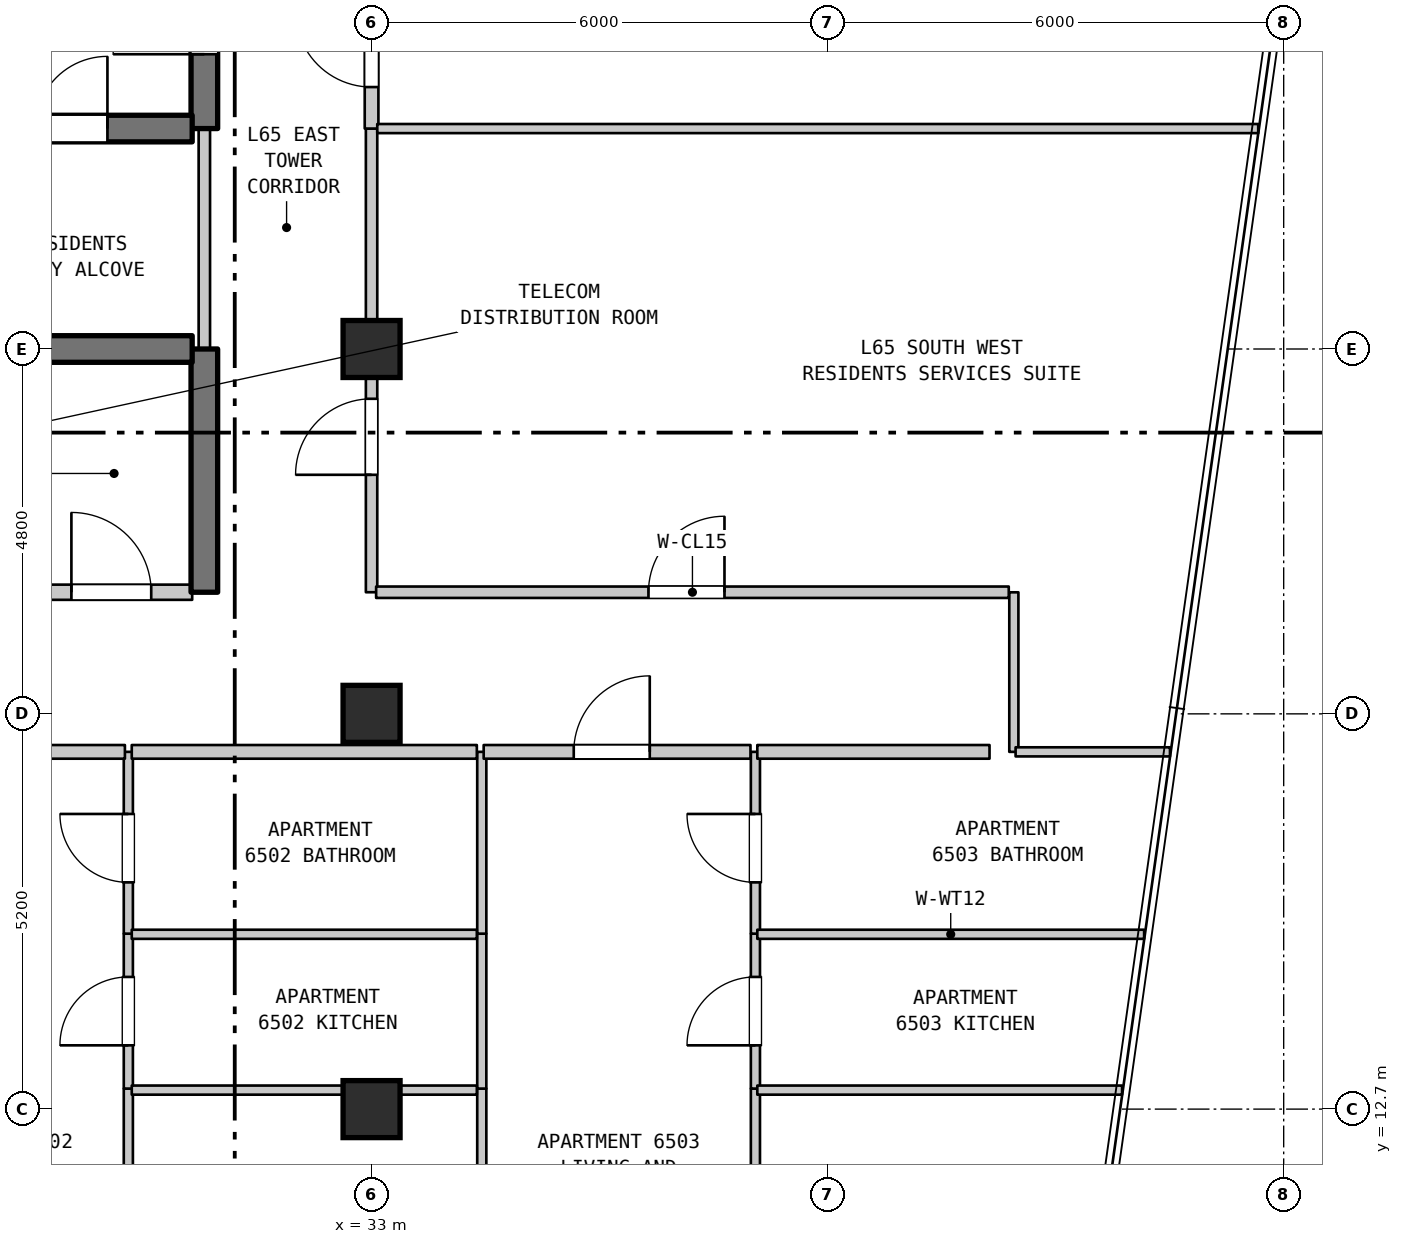
"""IFC4 building model, lengths in metres.
Left out: names, types, materials, properties, quantities, classifications, styles, units other than length and angle.
Written with IfcOpenShell. Run it as: python <this file> out.ifc"""

import sys

from ifc_helpers import new_model, si_unit, direction, frame, frame_2d, origin, origin_2d, place, context, subcontext, project, spatial, rectangle, extrude, element, fill, save


model = new_model("IFC4")
c1 = context("Model", 3, precision=1e-05, world=origin(), true_north=direction((0.0, 1.0)))
c2 = subcontext(c1, "Body", "Model", "MODEL_VIEW")
j1 = project(units=[si_unit("LENGTHUNIT", "METRE"), si_unit("PLANEANGLEUNIT", "RADIAN")], contexts=[c1])
p1 = place(None, origin())
s1 = spatial("IfcSite", under=j1, at=p1, CompositionType="ELEMENT")
p2 = place(p1, origin())
s2 = spatial("IfcBuilding", under=s1, at=p2, CompositionType="ELEMENT")
p3 = place(p2, frame((0.0, 0.0, 262.1)))
s3 = spatial("IfcBuildingStorey", under=s2, at=p3, CompositionType="ELEMENT", Elevation=262.1)
for number, where, z_axis, x_axis in (
    (1, (33.0, 12.7, 0.0), (0.0, 0.0, 1.0), (1.0, 0.0, 0.0)),
    (2, (33.0, 17.9, 0.0), (0.0, 0.0, 1.0), (1.0, 0.0, 0.0)),
    (3, (33.0, 22.7, 0.0), (0.0, 0.0, 1.0), (1.0, 0.0, 0.0)),
):
    element("IfcColumn", number, at=place(p3, frame(where, z_axis=z_axis, x_axis=x_axis)), inside=s3, PredefinedType="COLUMN", context=c2, shape_type="SweptSolid", body=[
        extrude(rectangle(XDim=0.75, YDim=0.75, at=origin_2d()), origin(), (0.0, 0.0, 1.0), 3.7),
    ])
p4 = place(p3, frame((29.8, 6.71, 0.0), z_axis=(0.0, 0.0, 1.0), x_axis=(0.0, 1.0, 0.0)))
e4 = element("IfcWall", 4, at=p4, inside=s3, PredefinedType="PARTITIONING", context=c2, shape_type="SweptSolid", body=[
    extrude(rectangle(XDim=6.26, YDim=0.12, at=frame_2d((3.13, 0.0))), origin(), (0.0, 0.0, 1.0), 3.39),
])
p5 = place(p4, frame((2.68, 0.0, 0.0)))
e5 = element("IfcOpeningElement", 5, at=p5, cuts=e4, PredefinedType="OPENING", context=c2, shape_type="SweptSolid", body=[
    extrude(rectangle(XDim=0.9, YDim=2.15, at=frame_2d((0.45, 1.075))), frame((0.0, 0.07, 0.0), z_axis=(0.0, -1.0, 0.0), x_axis=(1.0, 0.0, 0.0)), (0.0, 0.0, 1.0), 0.14),
])
p6 = place(p3, frame((29.8, 12.97, 0.0), z_axis=(0.0, 0.0, 1.0), x_axis=(0.0, 1.0, 0.0)))
e6 = element("IfcWall", 6, at=p6, inside=s3, PredefinedType="PARTITIONING", context=c2, shape_type="SweptSolid", body=[
    extrude(rectangle(XDim=2.038, YDim=0.12, at=frame_2d((1.019, 0.0))), origin(), (0.0, 0.0, 1.0), 3.39),
])
p7 = place(p6, frame((0.569, 0.0, 0.0)))
e7 = element("IfcOpeningElement", 7, at=p7, cuts=e6, PredefinedType="OPENING", context=c2, shape_type="SweptSolid", body=[
    extrude(rectangle(XDim=0.9, YDim=2.15, at=frame_2d((0.45, 1.075))), frame((0.0, 0.07, 0.0), z_axis=(0.0, -1.0, 0.0), x_axis=(1.0, 0.0, 0.0)), (0.0, 0.0, 1.0), 0.14),
])
p8 = place(p3, frame((29.8, 15.008, 0.0), z_axis=(0.0, 0.0, 1.0), x_axis=(0.0, 1.0, 0.0)))
e8 = element("IfcWall", 8, at=p8, inside=s3, PredefinedType="PARTITIONING", context=c2, shape_type="SweptSolid", body=[
    extrude(rectangle(XDim=2.392, YDim=0.12, at=frame_2d((1.196, 0.0))), origin(), (0.0, 0.0, 1.0), 3.39),
])
p9 = place(p8, frame((0.675, 0.0, 0.0)))
e9 = element("IfcOpeningElement", 9, at=p9, cuts=e8, PredefinedType="OPENING", context=c2, shape_type="SweptSolid", body=[
    extrude(rectangle(XDim=0.9, YDim=2.1, at=frame_2d((0.45, 1.05))), frame((0.0, 0.07, 0.0), z_axis=(0.0, -1.0, 0.0), x_axis=(1.0, 0.0, 0.0)), (0.0, 0.0, 1.0), 0.14),
])
p10 = place(p3, frame((30.8, 19.5, 0.0), z_axis=(0.0, 0.0, 1.0), x_axis=(0.0, 1.0, 0.0)))
e10 = element("IfcWall", 10, at=p10, inside=s3, PredefinedType="SHEAR", context=c2, shape_type="SweptSolid", body=[
    extrude(rectangle(XDim=3.2, YDim=0.35, at=frame_2d((1.6, 0.0))), origin(), (0.0, 0.0, 1.0), 3.39),
])
p11 = place(p3, frame((30.8, 22.7, 0.0), z_axis=(0.0, 0.0, 1.0), x_axis=(0.0, 1.0, 0.0)))
e11 = element("IfcWall", 11, at=p11, inside=s3, PredefinedType="STANDARD", context=c2, shape_type="SweptSolid", body=[
    extrude(rectangle(XDim=2.9, YDim=0.15, at=frame_2d((1.45, 0.0))), origin(), (0.0, 0.0, 1.0), 3.39),
])
p12 = place(p3, frame((30.8, 25.6, 0.0), z_axis=(0.0, 0.0, 1.0), x_axis=(0.0, 1.0, 0.0)))
e12 = element("IfcWall", 12, at=p12, inside=s3, PredefinedType="SHEAR", context=c2, shape_type="SweptSolid", body=[
    extrude(rectangle(XDim=3.3, YDim=0.35, at=frame_2d((1.65, 0.0))), origin(), (0.0, 0.0, 1.0), 3.39),
])
p13 = place(p12, frame((0.978, 0.0, 0.0)))
e13 = element("IfcOpeningElement", 13, at=p13, cuts=e12, PredefinedType="OPENING", context=c2, shape_type="SweptSolid", body=[
    extrude(rectangle(XDim=1.2, YDim=2.2, at=frame_2d((0.6, 1.1))), frame((0.0, 0.185, 0.0), z_axis=(0.0, -1.0, 0.0), x_axis=(1.0, 0.0, 0.0)), (0.0, 0.0, 1.0), 0.37),
])
p14 = place(p3, frame((33.0, 19.5, 0.0), z_axis=(0.0, 0.0, 1.0), x_axis=(0.0, 1.0, 0.0)))
e14 = element("IfcWall", 14, at=p14, inside=s3, PredefinedType="STANDARD", context=c2, shape_type="SweptSolid", body=[
    extrude(rectangle(XDim=6.1, YDim=0.15, at=frame_2d((3.05, 0.0))), origin(), (0.0, 0.0, 1.0), 3.1),
])
p15 = place(p14, frame((1.545, 0.0, 0.0)))
e15 = element("IfcOpeningElement", 15, at=p15, cuts=e14, PredefinedType="OPENING", context=c2, shape_type="SweptSolid", body=[
    extrude(rectangle(XDim=1.0, YDim=2.15, at=frame_2d((0.5, 1.075))), frame((0.0, 0.085, 0.0), z_axis=(0.0, -1.0, 0.0), x_axis=(1.0, 0.0, 0.0)), (0.0, 0.0, 1.0), 0.17),
])
p16 = place(p3, frame((33.0, 25.6, 0.0), z_axis=(0.0, 0.0, 1.0), x_axis=(0.0, 1.0, 0.0)))
e16 = element("IfcWall", 16, at=p16, inside=s3, PredefinedType="STANDARD", context=c2, shape_type="SweptSolid", body=[
    extrude(rectangle(XDim=2.3, YDim=0.18, at=frame_2d((1.15, 0.0))), origin(), (0.0, 0.0, 1.0), 3.1),
])
p17 = place(p16, frame((0.546, 0.0, 0.0)))
e17 = element("IfcOpeningElement", 17, at=p17, cuts=e16, PredefinedType="OPENING", context=c2, shape_type="SweptSolid", body=[
    extrude(rectangle(XDim=1.0, YDim=2.15, at=frame_2d((0.5, 1.075))), frame((0.0, 0.1, 0.0), z_axis=(0.0, -1.0, 0.0), x_axis=(1.0, 0.0, 0.0)), (0.0, 0.0, 1.0), 0.2),
])
p18 = place(p3, frame((34.45, 6.71, 0.0), z_axis=(0.0, 0.0, 1.0), x_axis=(0.0, 1.0, 0.0)))
e18 = element("IfcWall", 18, at=p18, inside=s3, PredefinedType="PARTITIONING", context=c2, shape_type="SweptSolid", body=[
    extrude(rectangle(XDim=6.26, YDim=0.12, at=frame_2d((3.13, 0.0))), origin(), (0.0, 0.0, 1.0), 3.39),
])
p19 = place(p3, frame((34.45, 12.97, 0.0), z_axis=(0.0, 0.0, 1.0), x_axis=(0.0, 1.0, 0.0)))
e19 = element("IfcWall", 19, at=p19, inside=s3, PredefinedType="PARTITIONING", context=c2, shape_type="SweptSolid", body=[
    extrude(rectangle(XDim=2.038, YDim=0.12, at=frame_2d((1.019, 0.0))), origin(), (0.0, 0.0, 1.0), 3.39),
])
p20 = place(p3, frame((34.45, 15.008, 0.0), z_axis=(0.0, 0.0, 1.0), x_axis=(0.0, 1.0, 0.0)))
e20 = element("IfcWall", 20, at=p20, inside=s3, PredefinedType="PARTITIONING", context=c2, shape_type="SweptSolid", body=[
    extrude(rectangle(XDim=2.392, YDim=0.12, at=frame_2d((1.196, 0.0))), origin(), (0.0, 0.0, 1.0), 3.39),
])
p21 = place(p3, frame((38.05, 6.71, 0.0), z_axis=(0.0, 0.0, 1.0), x_axis=(0.0, 1.0, 0.0)))
e21 = element("IfcWall", 21, at=p21, inside=s3, PredefinedType="PARTITIONING", context=c2, shape_type="SweptSolid", body=[
    extrude(rectangle(XDim=6.26, YDim=0.12, at=frame_2d((3.13, 0.0))), origin(), (0.0, 0.0, 1.0), 3.39),
])
p22 = place(p21, frame((2.68, 0.0, 0.0)))
e22 = element("IfcOpeningElement", 22, at=p22, cuts=e21, PredefinedType="OPENING", context=c2, shape_type="SweptSolid", body=[
    extrude(rectangle(XDim=0.9, YDim=2.15, at=frame_2d((0.45, 1.075))), frame((0.0, 0.07, 0.0), z_axis=(0.0, -1.0, 0.0), x_axis=(1.0, 0.0, 0.0)), (0.0, 0.0, 1.0), 0.14),
])
p23 = place(p3, frame((38.05, 12.97, 0.0), z_axis=(0.0, 0.0, 1.0), x_axis=(0.0, 1.0, 0.0)))
e23 = element("IfcWall", 23, at=p23, inside=s3, PredefinedType="PARTITIONING", context=c2, shape_type="SweptSolid", body=[
    extrude(rectangle(XDim=2.038, YDim=0.12, at=frame_2d((1.019, 0.0))), origin(), (0.0, 0.0, 1.0), 3.39),
])
p24 = place(p23, frame((0.569, 0.0, 0.0)))
e24 = element("IfcOpeningElement", 24, at=p24, cuts=e23, PredefinedType="OPENING", context=c2, shape_type="SweptSolid", body=[
    extrude(rectangle(XDim=0.9, YDim=2.15, at=frame_2d((0.45, 1.075))), frame((0.0, 0.07, 0.0), z_axis=(0.0, -1.0, 0.0), x_axis=(1.0, 0.0, 0.0)), (0.0, 0.0, 1.0), 0.14),
])
p25 = place(p3, frame((38.05, 15.008, 0.0), z_axis=(0.0, 0.0, 1.0), x_axis=(0.0, 1.0, 0.0)))
e25 = element("IfcWall", 25, at=p25, inside=s3, PredefinedType="PARTITIONING", context=c2, shape_type="SweptSolid", body=[
    extrude(rectangle(XDim=2.392, YDim=0.12, at=frame_2d((1.196, 0.0))), origin(), (0.0, 0.0, 1.0), 3.39),
])
p26 = place(p25, frame((0.675, 0.0, 0.0)))
e26 = element("IfcOpeningElement", 26, at=p26, cuts=e25, PredefinedType="OPENING", context=c2, shape_type="SweptSolid", body=[
    extrude(rectangle(XDim=0.9, YDim=2.1, at=frame_2d((0.45, 1.05))), frame((0.0, 0.07, 0.0), z_axis=(0.0, -1.0, 0.0), x_axis=(1.0, 0.0, 0.0)), (0.0, 0.0, 1.0), 0.14),
])
p27 = place(p3, frame((41.45, 17.4, 0.0), z_axis=(0.0, 0.0, 1.0), x_axis=(0.0, 1.0, 0.0)))
e27 = element("IfcWall", 27, at=p27, inside=s3, PredefinedType="PARTITIONING", context=c2, shape_type="SweptSolid", body=[
    extrude(rectangle(XDim=2.099, YDim=0.12, at=frame_2d((1.05, 0.0))), origin(), (0.0, 0.0, 1.0), 3.39),
])
p28 = place(p3, frame((29.845, 12.95, 0.0), z_axis=(0.0, 0.0, 1.0), x_axis=(1.0, 0.0, 0.0)))
e28 = element("IfcWall", 28, at=p28, inside=s3, PredefinedType="PARTITIONING", context=c2, shape_type="SweptSolid", body=[
    extrude(rectangle(XDim=4.54, YDim=0.12, at=frame_2d((2.27, 0.0))), origin(), (0.0, 0.0, 1.0), 3.39),
])
p29 = place(p3, frame((38.075, 12.95, 0.0), z_axis=(0.0, 0.0, 1.0), x_axis=(1.0, 0.0, 0.0)))
e29 = element("IfcWall", 29, at=p29, inside=s3, PredefinedType="PARTITIONING", context=c2, shape_type="SweptSolid", body=[
    extrude(rectangle(XDim=4.799, YDim=0.12, at=frame_2d((2.399, 0.0))), origin(), (0.0, 0.0, 1.0), 3.39),
])
p30 = place(p3, frame((29.845, 15.0, 0.0), z_axis=(0.0, 0.0, 1.0), x_axis=(1.0, 0.0, 0.0)))
e30 = element("IfcWall", 30, at=p30, inside=s3, PredefinedType="PARTITIONING", context=c2, shape_type="SweptSolid", body=[
    extrude(rectangle(XDim=4.54, YDim=0.12, at=frame_2d((2.27, 0.0))), origin(), (0.0, 0.0, 1.0), 3.39),
])
p31 = place(p3, frame((38.075, 15.0, 0.0), z_axis=(0.0, 0.0, 1.0), x_axis=(1.0, 0.0, 0.0)))
e31 = element("IfcWall", 31, at=p31, inside=s3, PredefinedType="PARTITIONING", context=c2, shape_type="SweptSolid", body=[
    extrude(rectangle(XDim=5.089, YDim=0.12, at=frame_2d((2.544, 0.0))), origin(), (0.0, 0.0, 1.0), 3.39),
])
p32 = place(p3, frame((26.245, 17.4, 0.0), z_axis=(0.0, 0.0, 1.0), x_axis=(1.0, 0.0, 0.0)))
e32 = element("IfcWall", 32, at=p32, inside=s3, PredefinedType="STANDARD", context=c2, shape_type="SweptSolid", body=[
    extrude(rectangle(XDim=3.51, YDim=0.18, at=frame_2d((1.755, 0.0))), origin(), (0.0, 0.0, 1.0), 3.39),
])
p33 = place(p32, frame((1.185, 0.0, 0.0)))
e33 = element("IfcOpeningElement", 33, at=p33, cuts=e32, PredefinedType="OPENING", context=c2, shape_type="SweptSolid", body=[
    extrude(rectangle(XDim=1.0, YDim=2.15, at=frame_2d((0.5, 1.075))), frame((0.0, 0.1, 0.0), z_axis=(0.0, -1.0, 0.0), x_axis=(1.0, 0.0, 0.0)), (0.0, 0.0, 1.0), 0.2),
])
p34 = place(p3, frame((29.845, 17.4, 0.0), z_axis=(0.0, 0.0, 1.0), x_axis=(1.0, 0.0, 0.0)))
e34 = element("IfcWall", 34, at=p34, inside=s3, PredefinedType="STANDARD", context=c2, shape_type="SweptSolid", body=[
    extrude(rectangle(XDim=4.54, YDim=0.18, at=frame_2d((2.27, 0.0))), origin(), (0.0, 0.0, 1.0), 3.39),
])
p35 = place(p3, frame((34.475, 17.4, 0.0), z_axis=(0.0, 0.0, 1.0), x_axis=(1.0, 0.0, 0.0)))
e35 = element("IfcWall", 35, at=p35, inside=s3, PredefinedType="STANDARD", context=c2, shape_type="SweptSolid", body=[
    extrude(rectangle(XDim=3.51, YDim=0.18, at=frame_2d((1.755, 0.0))), origin(), (0.0, 0.0, 1.0), 3.39),
])
p36 = place(p35, frame((1.185, 0.0, 0.0)))
e36 = element("IfcOpeningElement", 36, at=p36, cuts=e35, PredefinedType="OPENING", context=c2, shape_type="SweptSolid", body=[
    extrude(rectangle(XDim=1.0, YDim=2.15, at=frame_2d((0.5, 1.075))), frame((0.0, 0.1, 0.0), z_axis=(0.0, -1.0, 0.0), x_axis=(1.0, 0.0, 0.0)), (0.0, 0.0, 1.0), 0.2),
])
p37 = place(p3, frame((38.075, 17.4, 0.0), z_axis=(0.0, 0.0, 1.0), x_axis=(1.0, 0.0, 0.0)))
e37 = element("IfcWall", 37, at=p37, inside=s3, PredefinedType="STANDARD", context=c2, shape_type="SweptSolid", body=[
    extrude(rectangle(XDim=3.055, YDim=0.18, at=frame_2d((1.527, 0.0))), origin(), (0.0, 0.0, 1.0), 3.39),
])
p38 = place(p3, frame((41.473, 17.4, 0.0), z_axis=(0.0, 0.0, 1.0), x_axis=(1.0, 0.0, 0.0)))
e38 = element("IfcWall", 38, at=p38, inside=s3, PredefinedType="PARTITIONING", context=c2, shape_type="SweptSolid", body=[
    extrude(rectangle(XDim=2.031, YDim=0.12, at=frame_2d((1.016, 0.0))), origin(), (0.0, 0.0, 1.0), 3.39),
])
p39 = place(p3, frame((28.585, 19.5, 0.0), z_axis=(0.0, 0.0, 1.0), x_axis=(1.0, 0.0, 0.0)))
e39 = element("IfcWall", 39, at=p39, inside=s3, PredefinedType="STANDARD", context=c2, shape_type="SweptSolid", body=[
    extrude(rectangle(XDim=2.055, YDim=0.2, at=frame_2d((1.027, 0.0))), origin(), (0.0, 0.0, 1.0), 3.39),
])
p40 = place(p39, frame((0.466, 0.0, 0.0)))
e40 = element("IfcOpeningElement", 40, at=p40, cuts=e39, PredefinedType="OPENING", context=c2, shape_type="SweptSolid", body=[
    extrude(rectangle(XDim=1.05, YDim=2.15, at=frame_2d((0.525, 1.075))), frame((0.0, 0.11, 0.0), z_axis=(0.0, -1.0, 0.0), x_axis=(1.0, 0.0, 0.0)), (0.0, 0.0, 1.0), 0.22),
])
p41 = place(p3, frame((33.06, 19.5, 0.0), z_axis=(0.0, 0.0, 1.0), x_axis=(1.0, 0.0, 0.0)))
e41 = element("IfcWall", 41, at=p41, inside=s3, PredefinedType="STANDARD", context=c2, shape_type="SweptSolid", body=[
    extrude(rectangle(XDim=8.323, YDim=0.15, at=frame_2d((4.162, 0.0))), origin(), (0.0, 0.0, 1.0), 3.39),
])
p42 = place(p41, frame((3.583, 0.0, 0.0)))
e42 = element("IfcOpeningElement", 42, at=p42, cuts=e41, PredefinedType="OPENING", context=c2, shape_type="SweptSolid", body=[
    extrude(rectangle(XDim=1.0, YDim=2.15, at=frame_2d((0.5, 1.075))), frame((0.0, 0.085, 0.0), z_axis=(0.0, -1.0, 0.0), x_axis=(1.0, 0.0, 0.0)), (0.0, 0.0, 1.0), 0.17),
])
p43 = place(p3, frame((28.585, 22.7, 0.0), z_axis=(0.0, 0.0, 1.0), x_axis=(1.0, 0.0, 0.0)))
e43 = element("IfcWall", 43, at=p43, inside=s3, PredefinedType="SHEAR", context=c2, shape_type="SweptSolid", body=[
    extrude(rectangle(XDim=2.055, YDim=0.35, at=frame_2d((1.027, 0.0))), origin(), (0.0, 0.0, 1.0), 3.39),
])
p44 = place(p3, frame((27.46, 25.6, 0.0), z_axis=(0.0, 0.0, 1.0), x_axis=(1.0, 0.0, 0.0)))
e44 = element("IfcWall", 44, at=p44, inside=s3, PredefinedType="SHEAR", context=c2, shape_type="SweptSolid", body=[
    extrude(rectangle(XDim=3.18, YDim=0.35, at=frame_2d((1.59, 0.0))), origin(), (0.0, 0.0, 1.0), 3.39),
])
p45 = place(p44, frame((1.115, 0.0, 0.0)))
e45 = element("IfcOpeningElement", 45, at=p45, cuts=e44, PredefinedType="OPENING", context=c2, shape_type="SweptSolid", body=[
    extrude(rectangle(XDim=0.95, YDim=2.15, at=frame_2d((0.475, 1.075))), frame((0.0, 0.185, 0.0), z_axis=(0.0, -1.0, 0.0), x_axis=(1.0, 0.0, 0.0)), (0.0, 0.0, 1.0), 0.37),
])
p46 = place(p3, frame((33.075, 25.6, 0.0), z_axis=(0.0, 0.0, 1.0), x_axis=(1.0, 0.0, 0.0)))
e46 = element("IfcWall", 46, at=p46, inside=s3, PredefinedType="PARTITIONING", context=c2, shape_type="SweptSolid", body=[
    extrude(rectangle(XDim=11.59, YDim=0.12, at=frame_2d((5.795, 0.0))), origin(), (0.0, 0.0, 1.0), 3.39),
])
p47 = place(p7, origin())
e47 = element("IfcDoor", 47, at=p47, inside=s3, OperationType="SINGLE_SWING_LEFT", PredefinedType="DOOR", context=c2, shape_type="SweptSolid", body=[
    extrude(rectangle(XDim=0.9, YDim=2.15, at=frame_2d((0.45, 1.075))), frame((0.0, 0.025, 0.0), z_axis=(0.0, -1.0, 0.0), x_axis=(1.0, 0.0, 0.0)), (0.0, 0.0, 1.0), 0.05),
])
fill(e7, e47)
p48 = place(p9, origin())
e48 = element("IfcDoor", 48, at=p48, inside=s3, OperationType="SINGLE_SWING_RIGHT", PredefinedType="DOOR", context=c2, shape_type="SweptSolid", body=[
    extrude(rectangle(XDim=0.9, YDim=2.1, at=frame_2d((0.45, 1.05))), frame((0.0, 0.025, 0.0), z_axis=(0.0, -1.0, 0.0), x_axis=(1.0, 0.0, 0.0)), (0.0, 0.0, 1.0), 0.05),
])
fill(e9, e48)
p49 = place(p13, origin())
e49 = element("IfcDoor", 49, at=p49, inside=s3, OperationType="SINGLE_SWING_LEFT", PredefinedType="DOOR", context=c2, shape_type="SweptSolid", body=[
    extrude(rectangle(XDim=1.2, YDim=2.2, at=frame_2d((0.6, 1.1))), frame((0.0, 0.025, 0.0), z_axis=(0.0, -1.0, 0.0), x_axis=(1.0, 0.0, 0.0)), (0.0, 0.0, 1.0), 0.05),
])
fill(e13, e49)
p50 = place(p15, origin())
e50 = element("IfcDoor", 50, at=p50, inside=s3, OperationType="SINGLE_SWING_LEFT", PredefinedType="DOOR", context=c2, shape_type="SweptSolid", body=[
    extrude(rectangle(XDim=1.0, YDim=2.15, at=frame_2d((0.5, 1.075))), frame((0.0, 0.025, 0.0), z_axis=(0.0, -1.0, 0.0), x_axis=(1.0, 0.0, 0.0)), (0.0, 0.0, 1.0), 0.05),
])
fill(e15, e50)
p51 = place(p17, origin())
e51 = element("IfcDoor", 51, at=p51, inside=s3, OperationType="SINGLE_SWING_RIGHT", PredefinedType="DOOR", context=c2, shape_type="SweptSolid", body=[
    extrude(rectangle(XDim=1.0, YDim=2.15, at=frame_2d((0.5, 1.075))), frame((0.0, 0.025, 0.0), z_axis=(0.0, -1.0, 0.0), x_axis=(1.0, 0.0, 0.0)), (0.0, 0.0, 1.0), 0.05),
])
fill(e17, e51)
p52 = place(p24, origin())
e52 = element("IfcDoor", 52, at=p52, inside=s3, OperationType="SINGLE_SWING_LEFT", PredefinedType="DOOR", context=c2, shape_type="SweptSolid", body=[
    extrude(rectangle(XDim=0.9, YDim=2.15, at=frame_2d((0.45, 1.075))), frame((0.0, 0.025, 0.0), z_axis=(0.0, -1.0, 0.0), x_axis=(1.0, 0.0, 0.0)), (0.0, 0.0, 1.0), 0.05),
])
fill(e24, e52)
p53 = place(p26, origin())
e53 = element("IfcDoor", 53, at=p53, inside=s3, OperationType="SINGLE_SWING_RIGHT", PredefinedType="DOOR", context=c2, shape_type="SweptSolid", body=[
    extrude(rectangle(XDim=0.9, YDim=2.1, at=frame_2d((0.45, 1.05))), frame((0.0, 0.025, 0.0), z_axis=(0.0, -1.0, 0.0), x_axis=(1.0, 0.0, 0.0)), (0.0, 0.0, 1.0), 0.05),
])
fill(e26, e53)
p54 = place(p36, origin())
e54 = element("IfcDoor", 54, at=p54, inside=s3, OperationType="SINGLE_SWING_RIGHT", PredefinedType="DOOR", context=c2, shape_type="SweptSolid", body=[
    extrude(rectangle(XDim=1.0, YDim=2.15, at=frame_2d((0.5, 1.075))), frame((0.0, 0.025, 0.0), z_axis=(0.0, -1.0, 0.0), x_axis=(1.0, 0.0, 0.0)), (0.0, 0.0, 1.0), 0.05),
])
fill(e36, e54)
p55 = place(p40, origin())
e55 = element("IfcDoor", 55, at=p55, inside=s3, OperationType="SINGLE_SWING_LEFT", PredefinedType="DOOR", context=c2, shape_type="SweptSolid", body=[
    extrude(rectangle(XDim=1.05, YDim=2.15, at=frame_2d((0.525, 1.075))), frame((0.0, 0.025, 0.0), z_axis=(0.0, -1.0, 0.0), x_axis=(1.0, 0.0, 0.0)), (0.0, 0.0, 1.0), 0.05),
])
fill(e40, e55)
p56 = place(p42, origin())
e56 = element("IfcDoor", 56, at=p56, inside=s3, OperationType="SINGLE_SWING_RIGHT", PredefinedType="DOOR", context=c2, shape_type="SweptSolid", body=[
    extrude(rectangle(XDim=1.0, YDim=2.15, at=frame_2d((0.5, 1.075))), frame((0.0, 0.025, 0.0), z_axis=(0.0, -1.0, 0.0), x_axis=(1.0, 0.0, 0.0)), (0.0, 0.0, 1.0), 0.05),
])
fill(e42, e56)
p57 = place(p45, origin())
e57 = element("IfcDoor", 57, at=p57, inside=s3, OperationType="SINGLE_SWING_RIGHT", PredefinedType="DOOR", context=c2, shape_type="SweptSolid", body=[
    extrude(rectangle(XDim=0.95, YDim=2.15, at=frame_2d((0.475, 1.075))), frame((0.0, 0.025, 0.0), z_axis=(0.0, -1.0, 0.0), x_axis=(1.0, 0.0, 0.0)), (0.0, 0.0, 1.0), 0.05),
])
fill(e45, e57)
save(model, sys.argv[1])
